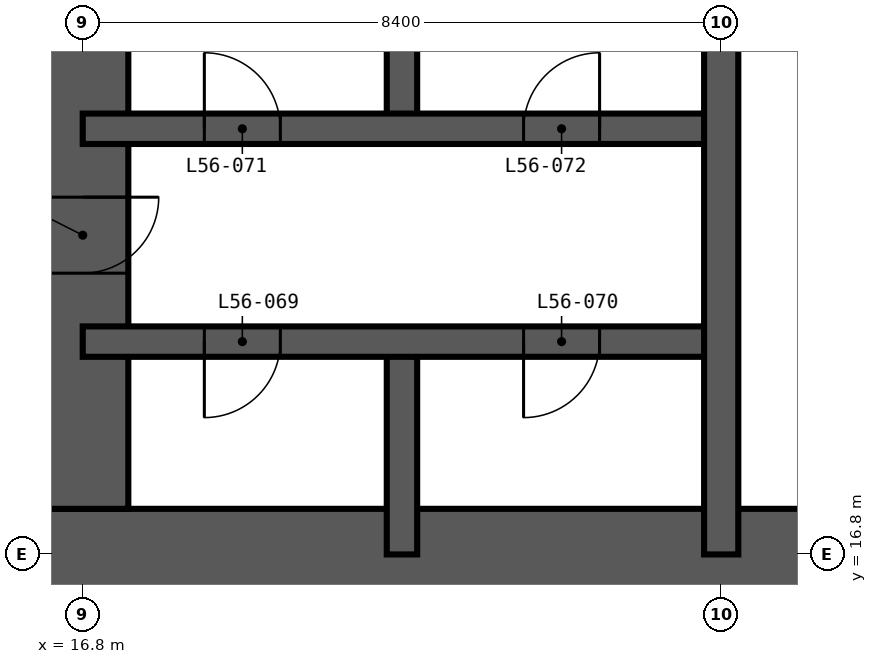
"""IFC4 building model, lengths in metres.
Left out: names, types, materials, properties, quantities, classifications, styles, units other than length and angle.
Written with IfcOpenShell. Run it as: python <this file> out.ifc"""

import sys

from ifc_helpers import new_model, si_unit, direction, frame, frame_2d, origin, place, context, subcontext, project, spatial, rectangle, extrude, element, fill, save


model = new_model("IFC4")
c1 = context("Model", 3, precision=1e-05, world=origin(), true_north=direction((0.0, 1.0)))
c2 = subcontext(c1, "Body", "Model", "MODEL_VIEW")
j1 = project(units=[si_unit("LENGTHUNIT", "METRE"), si_unit("PLANEANGLEUNIT", "RADIAN")], contexts=[c1])
p1 = place(None, origin())
s1 = spatial("IfcSite", under=j1, at=p1, CompositionType="ELEMENT")
p2 = place(p1, origin())
s2 = spatial("IfcBuilding", under=s1, at=p2, CompositionType="ELEMENT")
p3 = place(p2, frame((0.0, 0.0, 216.6)))
s3 = spatial("IfcBuildingStorey", under=s2, at=p3, CompositionType="ELEMENT", Elevation=216.6)
p4 = place(p3, frame((16.2, 16.8, -0.35), z_axis=(0.0, 0.0, 1.0), x_axis=(1.0, 0.0, 0.0)))
e1 = element("IfcWall", 1, at=p4, inside=s3, PredefinedType="SHEAR", context=c2, shape_type="SweptSolid", body=[
    extrude(rectangle(XDim=26.4, YDim=1.2, at=frame_2d((13.2, 0.0))), origin(), (0.0, 0.0, 1.0), 3.55),
])
p5 = place(p4, frame((12.7, 0.0, 0.35)))
e2 = element("IfcOpeningElement", 2, at=p5, cuts=e1, PredefinedType="OPENING", context=c2, shape_type="SweptSolid", body=[
    extrude(rectangle(XDim=1.0, YDim=2.1, at=frame_2d((0.5, 1.05))), frame((0.0, 0.61, 0.0), z_axis=(0.0, -1.0, 0.0), x_axis=(1.0, 0.0, 0.0)), (0.0, 0.0, 1.0), 1.22),
])
p6 = place(p4, frame((19.0, 0.0, 0.35)))
e3 = element("IfcOpeningElement", 3, at=p6, cuts=e1, PredefinedType="OPENING", context=c2, shape_type="SweptSolid", body=[
    extrude(rectangle(XDim=1.0, YDim=2.1, at=frame_2d((0.5, 1.05))), frame((0.0, 0.61, 0.0), z_axis=(0.0, -1.0, 0.0), x_axis=(1.0, 0.0, 0.0)), (0.0, 0.0, 1.0), 1.22),
])
p7 = place(p3, frame((16.8, 41.4, -0.35), z_axis=(0.0, 0.0, 1.0), x_axis=(0.0, -1.0, 0.0)))
e4 = element("IfcWall", 4, at=p7, inside=s3, PredefinedType="SHEAR", context=c2, shape_type="SweptSolid", body=[
    extrude(rectangle(XDim=24.0, YDim=1.2, at=frame_2d((12.0, 0.0))), origin(), (0.0, 0.0, 1.0), 3.55),
])
p8 = place(p7, frame((11.1, 0.0, 0.35)))
e5 = element("IfcOpeningElement", 5, at=p8, cuts=e4, PredefinedType="OPENING", context=c2, shape_type="SweptSolid", body=[
    extrude(rectangle(XDim=1.8, YDim=2.2, at=frame_2d((0.9, 1.1))), frame((0.0, 0.61, 0.0), z_axis=(0.0, -1.0, 0.0), x_axis=(1.0, 0.0, 0.0)), (0.0, 0.0, 1.0), 1.22),
])
p9 = place(p7, frame((19.9, 0.0, 0.35)))
e6 = element("IfcOpeningElement", 6, at=p9, cuts=e4, PredefinedType="OPENING", context=c2, shape_type="SweptSolid", body=[
    extrude(rectangle(XDim=1.0, YDim=2.1, at=frame_2d((0.5, 1.05))), frame((0.0, 0.61, 0.0), z_axis=(0.0, -1.0, 0.0), x_axis=(1.0, 0.0, 0.0)), (0.0, 0.0, 1.0), 1.22),
])
p10 = place(p7, frame((5.2, 0.0, 0.35)))
e7 = element("IfcOpeningElement", 7, at=p10, cuts=e4, PredefinedType="OPENING", context=c2, shape_type="SweptSolid", body=[
    extrude(rectangle(XDim=1.0, YDim=2.1, at=frame_2d((0.5, 1.05))), frame((0.0, 0.61, 0.0), z_axis=(0.0, -1.0, 0.0), x_axis=(1.0, 0.0, 0.0)), (0.0, 0.0, 1.0), 1.22),
])
p11 = place(p3, frame((21.0, 16.8, -0.35), z_axis=(0.0, 0.0, 1.0), x_axis=(0.0, 1.0, 0.0)))
e8 = element("IfcWall", 8, at=p11, inside=s3, PredefinedType="SHEAR", context=c2, shape_type="SweptSolid", body=[
    extrude(rectangle(XDim=2.8, YDim=0.4, at=frame_2d((1.4, 0.0))), origin(), (0.0, 0.0, 1.0), 3.55),
])
p12 = place(p3, frame((21.0, 22.4, -0.35), z_axis=(0.0, 0.0, 1.0), x_axis=(0.0, 1.0, 0.0)))
e9 = element("IfcWall", 9, at=p12, inside=s3, PredefinedType="SHEAR", context=c2, shape_type="SweptSolid", body=[
    extrude(rectangle(XDim=5.6, YDim=0.4, at=frame_2d((2.8, 0.0))), origin(), (0.0, 0.0, 1.0), 3.55),
])
p13 = place(p3, frame((16.8, 19.6, -0.35), z_axis=(0.0, 0.0, 1.0), x_axis=(1.0, 0.0, 0.0)))
e10 = element("IfcWall", 10, at=p13, inside=s3, PredefinedType="SHEAR", context=c2, shape_type="SweptSolid", body=[
    extrude(rectangle(XDim=8.4, YDim=0.4, at=frame_2d((4.2, 0.0))), origin(), (0.0, 0.0, 1.0), 3.55),
])
p14 = place(p13, frame((1.6, 0.0, 0.35)))
e11 = element("IfcOpeningElement", 11, at=p14, cuts=e10, PredefinedType="OPENING", context=c2, shape_type="SweptSolid", body=[
    extrude(rectangle(XDim=1.0, YDim=2.1, at=frame_2d((0.5, 1.05))), frame((0.0, 0.21, 0.0), z_axis=(0.0, -1.0, 0.0), x_axis=(1.0, 0.0, 0.0)), (0.0, 0.0, 1.0), 0.42),
])
p15 = place(p13, frame((5.8, 0.0, 0.35)))
e12 = element("IfcOpeningElement", 12, at=p15, cuts=e10, PredefinedType="OPENING", context=c2, shape_type="SweptSolid", body=[
    extrude(rectangle(XDim=1.0, YDim=2.1, at=frame_2d((0.5, 1.05))), frame((0.0, 0.21, 0.0), z_axis=(0.0, -1.0, 0.0), x_axis=(1.0, 0.0, 0.0)), (0.0, 0.0, 1.0), 0.42),
])
p16 = place(p3, frame((16.8, 22.4, -0.35), z_axis=(0.0, 0.0, 1.0), x_axis=(1.0, 0.0, 0.0)))
e13 = element("IfcWall", 13, at=p16, inside=s3, PredefinedType="SHEAR", context=c2, shape_type="SweptSolid", body=[
    extrude(rectangle(XDim=8.4, YDim=0.4, at=frame_2d((4.2, 0.0))), origin(), (0.0, 0.0, 1.0), 3.55),
])
p17 = place(p16, frame((1.6, 0.0, 0.35)))
e14 = element("IfcOpeningElement", 14, at=p17, cuts=e13, PredefinedType="OPENING", context=c2, shape_type="SweptSolid", body=[
    extrude(rectangle(XDim=1.0, YDim=2.1, at=frame_2d((0.5, 1.05))), frame((0.0, 0.21, 0.0), z_axis=(0.0, -1.0, 0.0), x_axis=(1.0, 0.0, 0.0)), (0.0, 0.0, 1.0), 0.42),
])
p18 = place(p16, frame((5.8, 0.0, 0.35)))
e15 = element("IfcOpeningElement", 15, at=p18, cuts=e13, PredefinedType="OPENING", context=c2, shape_type="SweptSolid", body=[
    extrude(rectangle(XDim=1.0, YDim=2.1, at=frame_2d((0.5, 1.05))), frame((0.0, 0.21, 0.0), z_axis=(0.0, -1.0, 0.0), x_axis=(1.0, 0.0, 0.0)), (0.0, 0.0, 1.0), 0.42),
])
p19 = place(p3, frame((25.2, 16.8, -0.35), z_axis=(0.0, 0.0, 1.0), x_axis=(0.0, 1.0, 0.0)))
e16 = element("IfcWall", 16, at=p19, inside=s3, PredefinedType="SHEAR", context=c2, shape_type="SweptSolid", body=[
    extrude(rectangle(XDim=25.2, YDim=0.45, at=frame_2d((12.6, 0.0))), origin(), (0.0, 0.0, 1.0), 3.55),
])
p20 = place(p14, frame((1.0, 0.0, 0.0), z_axis=(0.0, 0.0, 1.0), x_axis=(-1.0, 0.0, 0.0)))
e17 = element("IfcDoor", 17, at=p20, inside=s3, OperationType="SINGLE_SWING_RIGHT", PredefinedType="DOOR", context=c2, shape_type="SweptSolid", body=[
    extrude(rectangle(XDim=1.0, YDim=2.1, at=frame_2d((0.5, 1.05))), frame((0.0, 0.025, 0.0), z_axis=(0.0, -1.0, 0.0), x_axis=(1.0, 0.0, 0.0)), (0.0, 0.0, 1.0), 0.05),
])
fill(e11, e17)
p21 = place(p15, frame((1.0, 0.0, 0.0), z_axis=(0.0, 0.0, 1.0), x_axis=(-1.0, 0.0, 0.0)))
e18 = element("IfcDoor", 18, at=p21, inside=s3, OperationType="SINGLE_SWING_RIGHT", PredefinedType="DOOR", context=c2, shape_type="SweptSolid", body=[
    extrude(rectangle(XDim=1.0, YDim=2.1, at=frame_2d((0.5, 1.05))), frame((0.0, 0.025, 0.0), z_axis=(0.0, -1.0, 0.0), x_axis=(1.0, 0.0, 0.0)), (0.0, 0.0, 1.0), 0.05),
])
fill(e12, e18)
p22 = place(p17, origin())
e19 = element("IfcDoor", 19, at=p22, inside=s3, OperationType="SINGLE_SWING_LEFT", PredefinedType="DOOR", context=c2, shape_type="SweptSolid", body=[
    extrude(rectangle(XDim=1.0, YDim=2.1, at=frame_2d((0.5, 1.05))), frame((0.0, 0.025, 0.0), z_axis=(0.0, -1.0, 0.0), x_axis=(1.0, 0.0, 0.0)), (0.0, 0.0, 1.0), 0.05),
])
fill(e14, e19)
p23 = place(p18, origin())
e20 = element("IfcDoor", 20, at=p23, inside=s3, OperationType="SINGLE_SWING_RIGHT", PredefinedType="DOOR", context=c2, shape_type="SweptSolid", body=[
    extrude(rectangle(XDim=1.0, YDim=2.1, at=frame_2d((0.5, 1.05))), frame((0.0, 0.025, 0.0), z_axis=(0.0, -1.0, 0.0), x_axis=(1.0, 0.0, 0.0)), (0.0, 0.0, 1.0), 0.05),
])
fill(e15, e20)
p24 = place(p9, origin())
e21 = element("IfcDoor", 21, at=p24, inside=s3, OperationType="SINGLE_SWING_LEFT", PredefinedType="DOOR", context=c2, shape_type="SweptSolid", body=[
    extrude(rectangle(XDim=1.0, YDim=2.1, at=frame_2d((0.5, 1.05))), frame((0.0, 0.025, 0.0), z_axis=(0.0, -1.0, 0.0), x_axis=(1.0, 0.0, 0.0)), (0.0, 0.0, 1.0), 0.05),
])
fill(e6, e21)
save(model, sys.argv[1])
